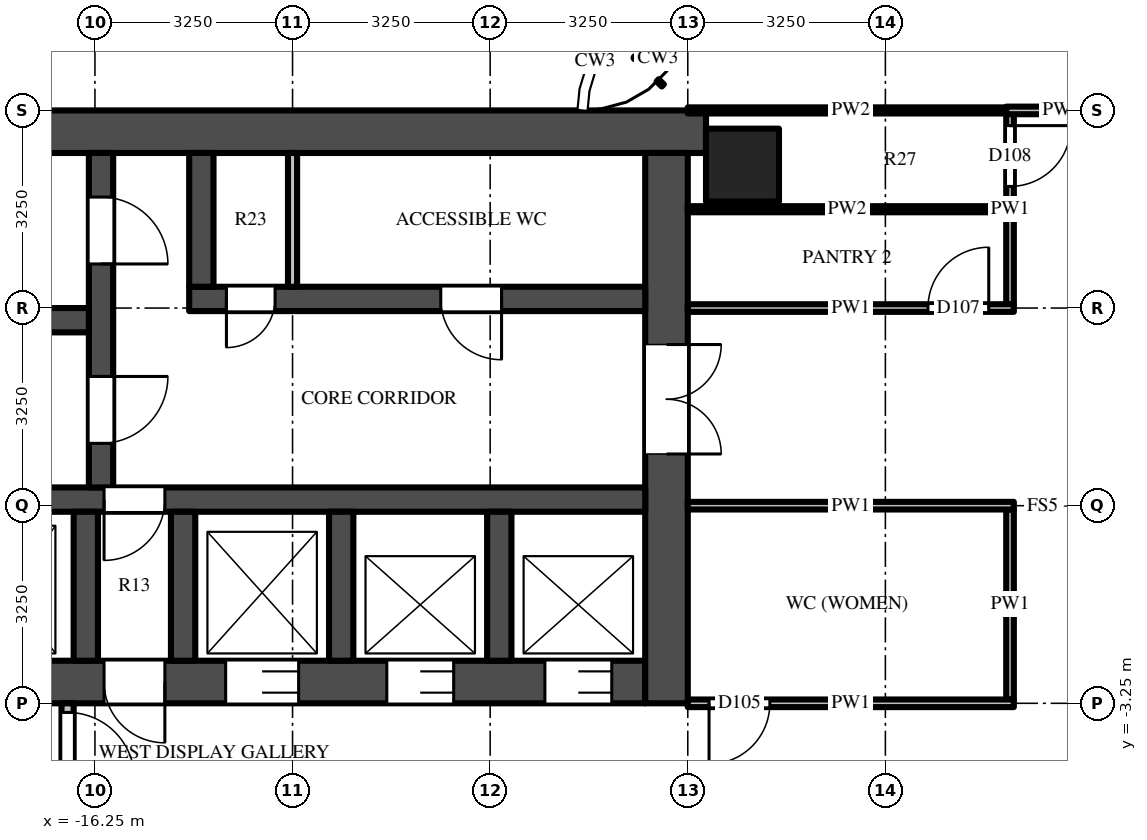
"""IFC4 building model, lengths in metres.
Left out: names, types, materials, properties, quantities, classifications, styles, units other than length and angle.
Written with IfcOpenShell. Run it as: python <this file> out.ifc"""

import sys

from ifc_helpers import new_model, si_unit, direction, frame, frame_2d, origin, origin_2d, place, context, subcontext, project, spatial, rectangle, extrude, source, transform, mapped, element, fill, save


model = new_model("IFC4")
c1 = context("Model", 3, precision=1e-05, world=origin(), true_north=direction((0.0, 1.0)))
c2 = subcontext(c1, "Body", "Model", "MODEL_VIEW")
j1 = project(units=[si_unit("LENGTHUNIT", "METRE"), si_unit("PLANEANGLEUNIT", "RADIAN")], contexts=[c1])
p1 = place(None, origin())
s1 = spatial("IfcSite", under=j1, at=p1, CompositionType="ELEMENT")
p2 = place(p1, origin())
s2 = spatial("IfcBuilding", under=s1, at=p2, CompositionType="ELEMENT")
p3 = place(p2, frame((0.0, 0.0, 169.8)))
s3 = spatial("IfcBuildingStorey", under=s2, at=p3, CompositionType="ELEMENT", Elevation=169.8)
m1 = source(origin(), c2, "Body", "SweptSolid", [
    extrude(rectangle(XDim=1.2, YDim=1.2, at=origin_2d()), origin(), (0.0, 0.0, 1.0), 3.9),
])
p4 = place(p3, frame((-5.6, 5.6, 0.0), z_axis=(0.0, 0.0, 1.0), x_axis=(1.0, 0.0, 0.0)))
e1 = element("IfcColumn", 1, at=p4, inside=s3, PredefinedType="COLUMN", context=c2, shape_type="MappedRepresentation", body=[
    mapped(m1, transform((0.0, 0.0, 0.0))),
])
m2 = source(origin(), c2, "Body", "SweptSolid", [
    extrude(rectangle(XDim=16.55, YDim=0.7, at=frame_2d((8.275, 0.0))), origin(), (0.0, 0.0, 1.0), 3.7),
])
p5 = place(p3, frame((-6.2, 6.15, 0.0), z_axis=(0.0, 0.0, 1.0), x_axis=(-1.0, 0.0, 0.0)))
e2 = element("IfcWall", 2, at=p5, inside=s3, PredefinedType="SHEAR", context=c2, shape_type="MappedRepresentation", body=[
    mapped(m2, transform((0.0, 0.0, 0.0))),
])
m3 = source(origin(), c2, "Body", "SweptSolid", [
    extrude(rectangle(XDim=14.85, YDim=0.7, at=frame_2d((7.425, 0.0))), origin(), (0.0, 0.0, 1.0), 3.7),
])
p6 = place(p3, frame((-7.2, -2.9, 0.0), z_axis=(0.0, 0.0, 1.0), x_axis=(-1.0, 0.0, 0.0)))
e3 = element("IfcWall", 3, at=p6, inside=s3, PredefinedType="SHEAR", context=c2, shape_type="MappedRepresentation", body=[
    mapped(m3, transform((0.0, 0.0, 0.0))),
])
m4 = source(origin(), c2, "Body", "SweptSolid", [
    extrude(rectangle(XDim=1.1, YDim=2.1, at=frame_2d((0.55, 1.05))), frame((0.0, 0.36, 0.0), z_axis=(0.0, -1.0, 0.0), x_axis=(1.0, 0.0, 0.0)), (0.0, 0.0, 1.0), 0.72),
])
p7 = place(p6, frame((0.55, 0.0, 0.0)))
e4 = element("IfcOpeningElement", 4, at=p7, cuts=e3, PredefinedType="OPENING", context=c2, shape_type="MappedRepresentation", body=[
    mapped(m4, transform((0.0, 0.0, 0.0))),
])
p8 = place(p6, frame((3.15, 0.0, 0.0)))
e5 = element("IfcOpeningElement", 5, at=p8, cuts=e3, PredefinedType="OPENING", context=c2, shape_type="MappedRepresentation", body=[
    mapped(m4, transform((0.0, 0.0, 0.0))),
])
m5 = source(origin(), c2, "Body", "SweptSolid", [
    extrude(rectangle(XDim=1.2, YDim=2.1, at=frame_2d((0.6, 1.05))), frame((0.0, 0.36, 0.0), z_axis=(0.0, -1.0, 0.0), x_axis=(1.0, 0.0, 0.0)), (0.0, 0.0, 1.0), 0.72),
])
p9 = place(p6, frame((5.7, 0.0, 0.0)))
e6 = element("IfcOpeningElement", 6, at=p9, cuts=e3, PredefinedType="OPENING", context=c2, shape_type="MappedRepresentation", body=[
    mapped(m5, transform((0.0, 0.0, 0.0))),
])
m6 = source(origin(), c2, "Body", "SweptSolid", [
    extrude(rectangle(XDim=1.3, YDim=2.1, at=frame_2d((0.65, 1.05))), frame((0.0, 0.36, 0.0), z_axis=(0.0, -1.0, 0.0), x_axis=(1.0, 0.0, 0.0)), (0.0, 0.0, 1.0), 0.72),
])
p10 = place(p6, frame((12.2, 0.0, 0.0)))
e7 = element("IfcOpeningElement", 7, at=p10, cuts=e3, PredefinedType="OPENING", context=c2, shape_type="MappedRepresentation", body=[
    mapped(m6, transform((0.0, 0.0, 0.0))),
])
p11 = place(p6, frame((9.85, 0.0, 0.0)))
e8 = element("IfcOpeningElement", 8, at=p11, cuts=e3, PredefinedType="OPENING", context=c2, shape_type="MappedRepresentation", body=[
    mapped(m5, transform((0.0, 0.0, 0.0))),
])
m7 = source(origin(), c2, "Body", "SweptSolid", [
    extrude(rectangle(XDim=1.0, YDim=2.1, at=frame_2d((0.5, 1.05))), frame((0.0, 0.36, 0.0), z_axis=(0.0, -1.0, 0.0), x_axis=(1.0, 0.0, 0.0)), (0.0, 0.0, 1.0), 0.72),
])
p12 = place(p6, frame((7.9, 0.0, 0.0)))
e9 = element("IfcOpeningElement", 9, at=p12, cuts=e3, PredefinedType="OPENING", context=c2, shape_type="MappedRepresentation", body=[
    mapped(m7, transform((0.0, 0.0, 0.0))),
])
m8 = source(origin(), c2, "Body", "SweptSolid", [
    extrude(rectangle(XDim=9.05, YDim=0.7, at=frame_2d((4.525, 0.0))), origin(), (0.0, 0.0, 1.0), 3.7),
])
p13 = place(p3, frame((-6.85, 5.8, 0.0), z_axis=(0.0, 0.0, 1.0), x_axis=(0.0, -1.0, 0.0)))
e10 = element("IfcWall", 10, at=p13, inside=s3, PredefinedType="SHEAR", context=c2, shape_type="MappedRepresentation", body=[
    mapped(m8, transform((0.0, 0.0, 0.0))),
])
m9 = source(origin(), c2, "Body", "SweptSolid", [
    extrude(rectangle(XDim=1.8, YDim=2.1, at=frame_2d((0.9, 1.05))), frame((0.0, 0.36, 0.0), z_axis=(0.0, -1.0, 0.0), x_axis=(1.0, 0.0, 0.0)), (0.0, 0.0, 1.0), 0.72),
])
p14 = place(p13, frame((3.15, 0.0, 0.0)))
e11 = element("IfcOpeningElement", 11, at=p14, cuts=e10, PredefinedType="OPENING", context=c2, shape_type="MappedRepresentation", body=[
    mapped(m9, transform((0.0, 0.0, 0.0))),
])
m10 = source(origin(), c2, "Body", "SweptSolid", [
    extrude(rectangle(XDim=7.5, YDim=0.4, at=frame_2d((3.75, 0.0))), origin(), (0.0, 0.0, 1.0), 3.7),
])
p15 = place(p3, frame((-7.2, 3.4, 0.0), z_axis=(0.0, 0.0, 1.0), x_axis=(-1.0, 0.0, 0.0)))
e12 = element("IfcWall", 12, at=p15, inside=s3, PredefinedType="SHEAR", context=c2, shape_type="MappedRepresentation", body=[
    mapped(m10, transform((0.0, 0.0, 0.0))),
])
m11 = source(origin(), c2, "Body", "SweptSolid", [
    extrude(rectangle(XDim=1.0, YDim=2.1, at=frame_2d((0.5, 1.05))), frame((0.0, 0.21, 0.0), z_axis=(0.0, -1.0, 0.0), x_axis=(1.0, 0.0, 0.0)), (0.0, 0.0, 1.0), 0.42),
])
p16 = place(p15, frame((2.363, 0.0, 0.0)))
e13 = element("IfcOpeningElement", 13, at=p16, cuts=e12, PredefinedType="OPENING", context=c2, shape_type="MappedRepresentation", body=[
    mapped(m11, transform((0.0, 0.0, 0.0))),
])
m12 = source(origin(), c2, "Body", "SweptSolid", [
    extrude(rectangle(XDim=0.8, YDim=2.1, at=frame_2d((0.4, 1.05))), frame((0.0, 0.21, 0.0), z_axis=(0.0, -1.0, 0.0), x_axis=(1.0, 0.0, 0.0)), (0.0, 0.0, 1.0), 0.42),
])
p17 = place(p15, frame((6.087, 0.0, 0.0)))
e14 = element("IfcOpeningElement", 14, at=p17, cuts=e12, PredefinedType="OPENING", context=c2, shape_type="MappedRepresentation", body=[
    mapped(m12, transform((0.0, 0.0, 0.0))),
])
m13 = source(origin(), c2, "Body", "SweptSolid", [
    extrude(rectangle(XDim=14.85, YDim=0.4, at=frame_2d((7.425, 0.0))), origin(), (0.0, 0.0, 1.0), 3.7),
])
p18 = place(p3, frame((-7.2, 0.1, 0.0), z_axis=(0.0, 0.0, 1.0), x_axis=(-1.0, 0.0, 0.0)))
e15 = element("IfcWall", 15, at=p18, inside=s3, PredefinedType="SHEAR", context=c2, shape_type="MappedRepresentation", body=[
    mapped(m13, transform((0.0, 0.0, 0.0))),
])
p19 = place(p18, frame((7.9, 0.0, 0.0)))
e16 = element("IfcOpeningElement", 16, at=p19, cuts=e15, PredefinedType="OPENING", context=c2, shape_type="MappedRepresentation", body=[
    mapped(m11, transform((0.0, 0.0, 0.0))),
])
m14 = source(origin(), c2, "Body", "SweptSolid", [
    extrude(rectangle(XDim=5.5, YDim=0.4, at=frame_2d((2.75, 0.0))), origin(), (0.0, 0.0, 1.0), 3.7),
])
p20 = place(p3, frame((-16.15, 5.8, 0.0), z_axis=(0.0, 0.0, 1.0), x_axis=(0.0, -1.0, 0.0)))
e17 = element("IfcWall", 17, at=p20, inside=s3, PredefinedType="SHEAR", context=c2, shape_type="MappedRepresentation", body=[
    mapped(m14, transform((0.0, 0.0, 0.0))),
])
m15 = source(origin(), c2, "Body", "SweptSolid", [
    extrude(rectangle(XDim=1.1, YDim=2.1, at=frame_2d((0.55, 1.05))), frame((0.0, 0.21, 0.0), z_axis=(0.0, -1.0, 0.0), x_axis=(1.0, 0.0, 0.0)), (0.0, 0.0, 1.0), 0.42),
])
p21 = place(p20, frame((0.725, 0.0, 0.0)))
e18 = element("IfcOpeningElement", 18, at=p21, cuts=e17, PredefinedType="OPENING", context=c2, shape_type="MappedRepresentation", body=[
    mapped(m15, transform((0.0, 0.0, 0.0))),
])
p22 = place(p20, frame((3.675, 0.0, 0.0)))
e19 = element("IfcOpeningElement", 19, at=p22, cuts=e17, PredefinedType="OPENING", context=c2, shape_type="MappedRepresentation", body=[
    mapped(m15, transform((0.0, 0.0, 0.0))),
])
m16 = source(origin(), c2, "Body", "SweptSolid", [
    extrude(rectangle(XDim=5.7, YDim=0.4, at=frame_2d((2.85, 0.0))), origin(), (0.0, 0.0, 1.0), 3.7),
])
p23 = place(p3, frame((-16.35, 3.05, 0.0), z_axis=(0.0, 0.0, 1.0), x_axis=(-1.0, 0.0, 0.0)))
e20 = element("IfcWall", 20, at=p23, inside=s3, PredefinedType="SHEAR", context=c2, shape_type="MappedRepresentation", body=[
    mapped(m16, transform((0.0, 0.0, 0.0))),
])
m17 = source(origin(), c2, "Body", "SweptSolid", [
    extrude(rectangle(XDim=2.2, YDim=0.4, at=frame_2d((1.1, 0.0))), origin(), (0.0, 0.0, 1.0), 3.7),
])
p24 = place(p3, frame((-14.5, 5.8, 0.0), z_axis=(0.0, 0.0, 1.0), x_axis=(0.0, -1.0, 0.0)))
e21 = element("IfcWall", 21, at=p24, inside=s3, PredefinedType="SHEAR", context=c2, shape_type="MappedRepresentation", body=[
    mapped(m17, transform((0.0, 0.0, 0.0))),
])
m18 = source(origin(), c2, "Body", "SweptSolid", [
    extrude(rectangle(XDim=2.45, YDim=0.4, at=frame_2d((1.225, 0.0))), origin(), (0.0, 0.0, 1.0), 3.7),
])
for number, where, z_axis, x_axis in (
    (22, (-9.6, -0.1, 0.0), (0.0, 0.0, 1.0), (0.0, -1.0, 0.0)),
    (23, (-12.2, -0.1, 0.0), (0.0, 0.0, 1.0), (0.0, -1.0, 0.0)),
    (24, (-14.8, -0.1, 0.0), (0.0, 0.0, 1.0), (0.0, -1.0, 0.0)),
    (25, (-16.4, -0.1, 0.0), (0.0, 0.0, 1.0), (0.0, -1.0, 0.0)),
):
    element("IfcWall", number, at=place(p3, frame(where, z_axis=z_axis, x_axis=x_axis)), inside=s3, PredefinedType="SHEAR", context=c2, shape_type="MappedRepresentation", body=[
        mapped(m18, transform((0.0, 0.0, 0.0))),
    ])
m19 = source(origin(), c2, "Body", "SweptSolid", [
    extrude(rectangle(XDim=3.25, YDim=0.2, at=frame_2d((1.625, 0.0))), origin(), (0.0, 0.0, 1.0), 3.7),
])
p25 = place(p3, frame((-16.7, -3.25, 0.0), z_axis=(0.0, 0.0, 1.0), x_axis=(0.0, -1.0, 0.0)))
e26 = element("IfcWall", 26, at=p25, inside=s3, PredefinedType="PARTITIONING", context=c2, shape_type="MappedRepresentation", body=[
    mapped(m19, transform((0.0, 0.0, 0.0))),
])
m20 = source(origin(), c2, "Body", "SweptSolid", [
    extrude(rectangle(XDim=1.1, YDim=2.1, at=frame_2d((0.55, 1.05))), frame((0.0, 0.11, 0.0), z_axis=(0.0, -1.0, 0.0), x_axis=(1.0, 0.0, 0.0)), (0.0, 0.0, 1.0), 0.22),
])
p26 = place(p25, frame((0.15, 0.0, 0.0)))
e27 = element("IfcOpeningElement", 27, at=p26, cuts=e26, PredefinedType="OPENING", context=c2, shape_type="MappedRepresentation", body=[
    mapped(m20, transform((0.0, 0.0, 0.0))),
])
m21 = source(origin(), c2, "Body", "SweptSolid", [
    extrude(rectangle(XDim=2.2, YDim=0.15, at=frame_2d((1.1, 0.0))), origin(), (0.0, 0.0, 1.0), 3.7),
])
p27 = place(p3, frame((-13.0, 5.8, 0.0), z_axis=(0.0, 0.0, 1.0), x_axis=(0.0, -1.0, 0.0)))
e28 = element("IfcWall", 28, at=p27, inside=s3, PredefinedType="PARTITIONING", context=c2, shape_type="MappedRepresentation", body=[
    mapped(m21, transform((0.0, 0.0, 0.0))),
])
m22 = source(origin(), c2, "Body", "SweptSolid", [
    extrude(rectangle(XDim=3.125, YDim=0.125, at=frame_2d((1.562, 0.0))), origin(), (0.0, 0.0, 1.0), 3.068),
])
p28 = place(p3, frame((-1.2, -0.062, 0.0), z_axis=(0.0, 0.0, 1.0), x_axis=(0.0, -1.0, 0.0)))
e29 = element("IfcWall", 29, at=p28, inside=s3, PredefinedType="PARTITIONING", context=c2, shape_type="MappedRepresentation", body=[
    mapped(m22, transform((0.0, 0.0, 0.0))),
])
m23 = source(origin(), c2, "Body", "SweptSolid", [
    extrude(rectangle(XDim=3.137, YDim=0.125, at=frame_2d((1.569, 0.0))), origin(), (0.0, 0.0, 1.0), 2.996),
])
p29 = place(p3, frame((-1.2, 6.45, 0.0), z_axis=(0.0, 0.0, 1.0), x_axis=(0.0, -1.0, 0.0)))
e30 = element("IfcWall", 30, at=p29, inside=s3, PredefinedType="PARTITIONING", context=c2, shape_type="MappedRepresentation", body=[
    mapped(m23, transform((0.0, 0.0, 0.0))),
])
m24 = source(origin(), c2, "Body", "SweptSolid", [
    extrude(rectangle(XDim=1.0, YDim=2.1, at=frame_2d((0.5, 1.05))), frame((0.0, 0.073, 0.0), z_axis=(0.0, -1.0, 0.0), x_axis=(1.0, 0.0, 0.0)), (0.0, 0.0, 1.0), 0.145),
])
p30 = place(p29, frame((0.2, 0.0, 0.0)))
e31 = element("IfcOpeningElement", 31, at=p30, cuts=e30, PredefinedType="OPENING", context=c2, shape_type="MappedRepresentation", body=[
    mapped(m24, transform((0.0, 0.0, 0.0))),
])
m25 = source(origin(), c2, "Body", "SweptSolid", [
    extrude(rectangle(XDim=5.363, YDim=0.125, at=frame_2d((2.681, 0.0))), origin(), (0.0, 0.0, 1.0), 2.996),
])
p31 = place(p3, frame((-1.137, -3.25, 0.0), z_axis=(0.0, 0.0, 1.0), x_axis=(-1.0, 0.0, 0.0)))
e32 = element("IfcWall", 32, at=p31, inside=s3, PredefinedType="PARTITIONING", context=c2, shape_type="MappedRepresentation", body=[
    mapped(m25, transform((0.0, 0.0, 0.0))),
])
p32 = place(p31, frame((4.012, 0.0, 0.0)))
e33 = element("IfcOpeningElement", 33, at=p32, cuts=e32, PredefinedType="OPENING", context=c2, shape_type="MappedRepresentation", body=[
    mapped(m24, transform((0.0, 0.0, 0.0))),
])
p33 = place(p3, frame((-1.137, 0.0, 0.0), z_axis=(0.0, 0.0, 1.0), x_axis=(-1.0, 0.0, 0.0)))
e34 = element("IfcWall", 34, at=p33, inside=s3, PredefinedType="PARTITIONING", context=c2, shape_type="MappedRepresentation", body=[
    mapped(m25, transform((0.0, 0.0, 0.0))),
])
p34 = place(p3, frame((-6.5, 3.25, 0.0), z_axis=(0.0, 0.0, 1.0), x_axis=(1.0, 0.0, 0.0)))
e35 = element("IfcWall", 35, at=p34, inside=s3, PredefinedType="PARTITIONING", context=c2, shape_type="MappedRepresentation", body=[
    mapped(m25, transform((0.0, 0.0, 0.0))),
])
p35 = place(p34, frame((3.95, 0.0, 0.0)))
e36 = element("IfcOpeningElement", 36, at=p35, cuts=e35, PredefinedType="OPENING", context=c2, shape_type="MappedRepresentation", body=[
    mapped(m24, transform((0.0, 0.0, 0.0))),
])
p36 = place(p3, frame((-6.5, 4.875, 0.0), z_axis=(0.0, 0.0, 1.0), x_axis=(1.0, 0.0, 0.0)))
e37 = element("IfcWall", 37, at=p36, inside=s3, PredefinedType="PARTITIONING", context=c2, shape_type="SweptSolid", body=[
    extrude(rectangle(XDim=5.238, YDim=0.1, at=frame_2d((2.619, 0.0))), origin(), (0.0, 0.0, 1.0), 2.996),
])
m26 = source(origin(), c2, "Body", "SweptSolid", [
    extrude(rectangle(XDim=5.363, YDim=0.1, at=frame_2d((2.681, 0.0))), origin(), (0.0, 0.0, 1.0), 2.78),
])
p37 = place(p3, frame((-6.5, 6.5, 0.0), z_axis=(0.0, 0.0, 1.0), x_axis=(1.0, 0.0, 0.0)))
e38 = element("IfcWall", 38, at=p37, inside=s3, PredefinedType="PARTITIONING", context=c2, shape_type="MappedRepresentation", body=[
    mapped(m26, transform((0.0, 0.0, 0.0))),
])
m27 = source(origin(), c2, "Body", "SweptSolid", [
    extrude(rectangle(XDim=1.825, YDim=0.125, at=frame_2d((0.913, 0.0))), origin(), (0.0, 0.0, 1.0), 3.7),
])
p38 = place(p3, frame((-1.262, 6.5, 0.0), z_axis=(0.0, 0.0, 1.0), x_axis=(1.0, 0.0, 0.0)))
e39 = element("IfcWall", 39, at=p38, inside=s3, PredefinedType="PARTITIONING", context=c2, shape_type="MappedRepresentation", body=[
    mapped(m27, transform((0.0, 0.0, 0.0))),
])
m28 = source(origin(), c2, "Body", "SweptSolid", [
    extrude(rectangle(XDim=1.1, YDim=2.1, at=frame_2d((0.55, 1.05))), frame((0.0, -0.275, 0.0), z_axis=(0.0, -1.0, 0.0), x_axis=(1.0, 0.0, 0.0)), (0.0, 0.0, 1.0), 0.05),
])
p39 = place(p7, origin())
e40 = element("IfcDoor", 40, at=p39, inside=s3, OperationType="DOUBLE_DOOR_SLIDING", PredefinedType="DOOR", context=c2, shape_type="MappedRepresentation", body=[
    mapped(m28, transform((0.0, 0.0, 0.0))),
])
fill(e4, e40)
p40 = place(p8, origin())
e41 = element("IfcDoor", 41, at=p40, inside=s3, OperationType="DOUBLE_DOOR_SLIDING", PredefinedType="DOOR", context=c2, shape_type="MappedRepresentation", body=[
    mapped(m28, transform((0.0, 0.0, 0.0))),
])
fill(e5, e41)
m29 = source(origin(), c2, "Body", "SweptSolid", [
    extrude(rectangle(XDim=1.2, YDim=2.1, at=frame_2d((0.6, 1.05))), frame((0.0, -0.275, 0.0), z_axis=(0.0, -1.0, 0.0), x_axis=(1.0, 0.0, 0.0)), (0.0, 0.0, 1.0), 0.05),
])
p41 = place(p9, origin())
e42 = element("IfcDoor", 42, at=p41, inside=s3, OperationType="DOUBLE_DOOR_SLIDING", PredefinedType="DOOR", context=c2, shape_type="MappedRepresentation", body=[
    mapped(m29, transform((0.0, 0.0, 0.0))),
])
fill(e6, e42)
m30 = source(origin(), c2, "Body", "SweptSolid", [
    extrude(rectangle(XDim=1.8, YDim=2.1, at=frame_2d((0.9, 1.05))), frame((0.0, -0.275, 0.0), z_axis=(0.0, -1.0, 0.0), x_axis=(1.0, 0.0, 0.0)), (0.0, 0.0, 1.0), 0.05),
])
p42 = place(p14, origin())
e43 = element("IfcDoor", 43, at=p42, inside=s3, OperationType="DOUBLE_DOOR_SINGLE_SWING", PredefinedType="DOOR", context=c2, shape_type="MappedRepresentation", body=[
    mapped(m30, transform((0.0, 0.0, 0.0))),
])
fill(e11, e43)
m31 = source(origin(), c2, "Body", "SweptSolid", [
    extrude(rectangle(XDim=1.1, YDim=2.1, at=frame_2d((0.55, 1.05))), frame((0.0, 0.025, 0.0), z_axis=(0.0, -1.0, 0.0), x_axis=(1.0, 0.0, 0.0)), (0.0, 0.0, 1.0), 0.05),
])
p43 = place(p21, origin())
e44 = element("IfcDoor", 44, at=p43, inside=s3, OperationType="SINGLE_SWING_RIGHT", PredefinedType="DOOR", context=c2, shape_type="MappedRepresentation", body=[
    mapped(m31, transform((0.0, 0.0, 0.0))),
])
fill(e18, e44)
p44 = place(p22, origin())
e45 = element("IfcDoor", 45, at=p44, inside=s3, OperationType="SINGLE_SWING_LEFT", PredefinedType="DOOR", context=c2, shape_type="MappedRepresentation", body=[
    mapped(m31, transform((0.0, 0.0, 0.0))),
])
fill(e19, e45)
m32 = source(origin(), c2, "Body", "SweptSolid", [
    extrude(rectangle(XDim=1.0, YDim=2.1, at=frame_2d((0.5, 1.05))), frame((0.0, 0.025, 0.0), z_axis=(0.0, -1.0, 0.0), x_axis=(1.0, 0.0, 0.0)), (0.0, 0.0, 1.0), 0.05),
])
p45 = place(p19, origin())
e46 = element("IfcDoor", 46, at=p45, inside=s3, OperationType="SINGLE_SWING_RIGHT", PredefinedType="DOOR", context=c2, shape_type="MappedRepresentation", body=[
    mapped(m32, transform((0.0, 0.0, 0.0))),
])
fill(e16, e46)
m33 = source(origin(), c2, "Body", "SweptSolid", [
    extrude(rectangle(XDim=1.0, YDim=2.1, at=frame_2d((0.5, 1.05))), frame((0.0, -0.275, 0.0), z_axis=(0.0, -1.0, 0.0), x_axis=(1.0, 0.0, 0.0)), (0.0, 0.0, 1.0), 0.05),
])
p46 = place(p12, origin())
e47 = element("IfcDoor", 47, at=p46, inside=s3, OperationType="SINGLE_SWING_LEFT", PredefinedType="DOOR", context=c2, shape_type="MappedRepresentation", body=[
    mapped(m33, transform((0.0, 0.0, 0.0))),
])
fill(e9, e47)
p47 = place(p26, origin())
e48 = element("IfcDoor", 48, at=p47, inside=s3, OperationType="SINGLE_SWING_RIGHT", PredefinedType="DOOR", context=c2, shape_type="MappedRepresentation", body=[
    mapped(m31, transform((0.0, 0.0, 0.0))),
])
fill(e27, e48)
p48 = place(p16, origin())
e49 = element("IfcDoor", 49, at=p48, inside=s3, OperationType="SINGLE_SWING_LEFT", PredefinedType="DOOR", context=c2, shape_type="MappedRepresentation", body=[
    mapped(m32, transform((0.0, 0.0, 0.0))),
])
fill(e13, e49)
m34 = source(origin(), c2, "Body", "SweptSolid", [
    extrude(rectangle(XDim=0.8, YDim=2.1, at=frame_2d((0.4, 1.05))), frame((0.0, 0.025, 0.0), z_axis=(0.0, -1.0, 0.0), x_axis=(1.0, 0.0, 0.0)), (0.0, 0.0, 1.0), 0.05),
])
p49 = place(p17, origin())
e50 = element("IfcDoor", 50, at=p49, inside=s3, OperationType="SINGLE_SWING_RIGHT", PredefinedType="DOOR", context=c2, shape_type="MappedRepresentation", body=[
    mapped(m34, transform((0.0, 0.0, 0.0))),
])
fill(e14, e50)
p50 = place(p32, origin())
e51 = element("IfcDoor", 51, at=p50, inside=s3, OperationType="SINGLE_SWING_RIGHT", PredefinedType="DOOR", context=c2, shape_type="MappedRepresentation", body=[
    mapped(m32, transform((0.0, 0.0, 0.0))),
])
fill(e33, e51)
p51 = place(p35, origin())
e52 = element("IfcDoor", 52, at=p51, inside=s3, OperationType="SINGLE_SWING_RIGHT", PredefinedType="DOOR", context=c2, shape_type="MappedRepresentation", body=[
    mapped(m32, transform((0.0, 0.0, 0.0))),
])
fill(e36, e52)
p52 = place(p30, origin())
e53 = element("IfcDoor", 53, at=p52, inside=s3, OperationType="SINGLE_SWING_LEFT", PredefinedType="DOOR", context=c2, shape_type="MappedRepresentation", body=[
    mapped(m32, transform((0.0, 0.0, 0.0))),
])
fill(e31, e53)
save(model, sys.argv[1])
